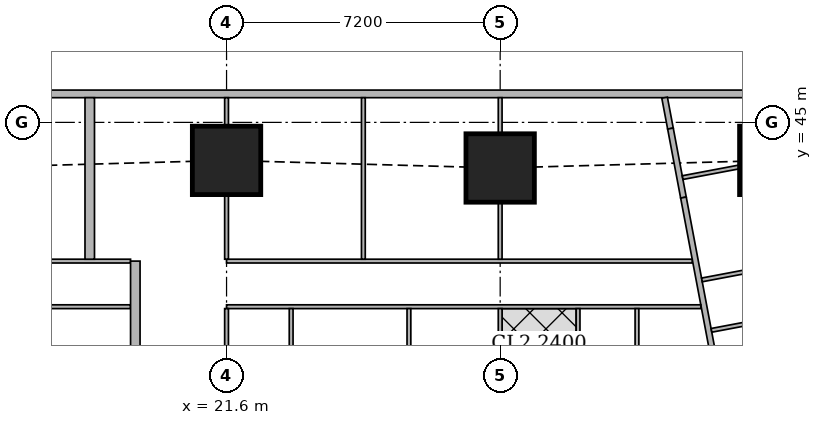
"""IFC4 building model, lengths in metres.
Left out: names, types, materials, properties, quantities, classifications, styles, units other than length and angle.
Written with IfcOpenShell. Run it as: python <this file> out.ifc"""

import sys

from ifc_helpers import new_model, si_unit, direction, frame, frame_2d, origin, origin_2d, place, context, subcontext, project, spatial, rectangle, extrude, element, fill, save


model = new_model("IFC4")
c1 = context("Model", 3, precision=1e-05, world=origin(), true_north=direction((0.0, 1.0)))
c2 = subcontext(c1, "Body", "Model", "MODEL_VIEW")
j1 = project(units=[si_unit("LENGTHUNIT", "METRE"), si_unit("PLANEANGLEUNIT", "RADIAN")], contexts=[c1])
p1 = place(None, origin())
s1 = spatial("IfcSite", under=j1, at=p1, CompositionType="ELEMENT")
p2 = place(p1, origin())
s2 = spatial("IfcBuilding", under=s1, at=p2, CompositionType="ELEMENT")
p3 = place(p2, frame((0.0, 0.0, 158.3)))
s3 = spatial("IfcBuildingStorey", under=s2, at=p3, CompositionType="ELEMENT", Elevation=158.3)
for number, where, z_axis, x_axis in (
    (1, (21.6, 44.0, 0.0), (0.0, 0.0, 1.0), (1.0, 0.0, 0.0)),
    (2, (28.8, 43.8, 0.0), (0.0, 0.0, 1.0), (1.0, 0.0, 0.0)),
    (3, (36.0, 44.0, 0.0), (0.0, 0.0, 1.0), (1.0, 0.0, 0.0)),
):
    element("IfcColumn", number, at=place(p3, frame(where, z_axis=z_axis, x_axis=x_axis)), inside=s3, PredefinedType="COLUMN", context=c2, shape_type="SweptSolid", body=[
        extrude(rectangle(XDim=1.8, YDim=1.8, at=origin_2d()), origin(), (0.0, 0.0, 1.0), 3.75),
    ])
p4 = place(p3, frame((40.106, 45.75, 0.0), z_axis=(0.0, 0.0, 1.0), x_axis=(-1.0, 0.0, 0.0)))
e4 = element("IfcWall", 4, at=p4, inside=s3, PredefinedType="SOLIDWALL", context=c2, shape_type="SweptSolid", body=[
    extrude(rectangle(XDim=37.943, YDim=0.2, at=frame_2d((18.971, 0.0))), origin(), (0.0, 0.0, 1.0), 3.5),
])
p5 = place(p4, frame((8.606, 0.0, 0.9)))
e5 = element("IfcOpeningElement", 5, at=p5, cuts=e4, PredefinedType="OPENING", context=c2, shape_type="SweptSolid", body=[
    extrude(rectangle(XDim=1.8, YDim=1.5, at=frame_2d((0.9, 0.75))), frame((0.0, 0.11, 0.0), z_axis=(0.0, -1.0, 0.0), x_axis=(1.0, 0.0, 0.0)), (0.0, 0.0, 1.0), 0.22),
])
p6 = place(p4, frame((12.206, 0.0, 0.9)))
e6 = element("IfcOpeningElement", 6, at=p6, cuts=e4, PredefinedType="OPENING", context=c2, shape_type="SweptSolid", body=[
    extrude(rectangle(XDim=1.8, YDim=1.5, at=frame_2d((0.9, 0.75))), frame((0.0, 0.11, 0.0), z_axis=(0.0, -1.0, 0.0), x_axis=(1.0, 0.0, 0.0)), (0.0, 0.0, 1.0), 0.22),
])
p7 = place(p4, frame((15.806, 0.0, 0.9)))
e7 = element("IfcOpeningElement", 7, at=p7, cuts=e4, PredefinedType="OPENING", context=c2, shape_type="SweptSolid", body=[
    extrude(rectangle(XDim=1.8, YDim=1.5, at=frame_2d((0.9, 0.75))), frame((0.0, 0.11, 0.0), z_axis=(0.0, -1.0, 0.0), x_axis=(1.0, 0.0, 0.0)), (0.0, 0.0, 1.0), 0.22),
])
p8 = place(p4, frame((19.406, 0.0, 0.9)))
e8 = element("IfcOpeningElement", 8, at=p8, cuts=e4, PredefinedType="OPENING", context=c2, shape_type="SweptSolid", body=[
    extrude(rectangle(XDim=1.8, YDim=1.5, at=frame_2d((0.9, 0.75))), frame((0.0, 0.11, 0.0), z_axis=(0.0, -1.0, 0.0), x_axis=(1.0, 0.0, 0.0)), (0.0, 0.0, 1.0), 0.22),
])
p9 = place(p4, frame((23.006, 0.0, 0.9)))
e9 = element("IfcOpeningElement", 9, at=p9, cuts=e4, PredefinedType="OPENING", context=c2, shape_type="SweptSolid", body=[
    extrude(rectangle(XDim=1.8, YDim=1.5, at=frame_2d((0.9, 0.75))), frame((0.0, 0.11, 0.0), z_axis=(0.0, -1.0, 0.0), x_axis=(1.0, 0.0, 0.0)), (0.0, 0.0, 1.0), 0.22),
])
p10 = place(p4, frame((26.606, 0.0, 0.9)))
e10 = element("IfcOpeningElement", 10, at=p10, cuts=e4, PredefinedType="OPENING", context=c2, shape_type="SweptSolid", body=[
    extrude(rectangle(XDim=1.8, YDim=1.5, at=frame_2d((0.9, 0.75))), frame((0.0, 0.11, 0.0), z_axis=(0.0, -1.0, 0.0), x_axis=(1.0, 0.0, 0.0)), (0.0, 0.0, 1.0), 0.22),
])
p11 = place(p3, frame((33.127, 45.65, 0.0), z_axis=(0.0, 0.0, 1.0), x_axis=(0.186176514576, -0.982516313056, 0.0)))
e11 = element("IfcWall", 11, at=p11, inside=s3, PredefinedType="SOLIDWALL", context=c2, shape_type="SweptSolid", body=[
    extrude(rectangle(XDim=0.827, YDim=0.15, at=frame_2d((0.414, 0.0))), origin(), (0.0, 0.0, 1.0), 3.5),
])
p12 = place(p3, frame((33.281, 44.837, 0.0), z_axis=(0.0, 0.0, 1.0), x_axis=(0.185198323004, -0.982701165745, 0.0)))
e12 = element("IfcWall", 12, at=p12, inside=s3, PredefinedType="SOLIDWALL", context=c2, shape_type="SweptSolid", body=[
    extrude(rectangle(XDim=1.847, YDim=0.15, at=frame_2d((0.923, 0.0))), origin(), (0.0, 0.0, 1.0), 2.1),
])
p13 = place(p3, frame((33.623, 43.022, 0.0), z_axis=(0.0, 0.0, 1.0), x_axis=(0.185596841028, -0.98262597798, 0.0)))
e13 = element("IfcWall", 13, at=p13, inside=s3, PredefinedType="SOLIDWALL", context=c2, shape_type="SweptSolid", body=[
    extrude(rectangle(XDim=41.66, YDim=0.15, at=frame_2d((20.83, 0.0))), origin(), (0.0, 0.0, 1.0), 2.5),
])
p14 = place(p13, frame((21.514, 0.0, 0.0)))
e14 = element("IfcOpeningElement", 14, at=p14, cuts=e13, PredefinedType="OPENING", context=c2, shape_type="SweptSolid", body=[
    extrude(rectangle(XDim=1.0, YDim=2.1, at=frame_2d((0.5, 1.05))), frame((0.0, 0.085, 0.0), z_axis=(0.0, -1.0, 0.0), x_axis=(1.0, 0.0, 0.0)), (0.0, 0.0, 1.0), 0.17),
])
p15 = place(p13, frame((27.062, 0.0, 0.0)))
e15 = element("IfcOpeningElement", 15, at=p15, cuts=e13, PredefinedType="OPENING", context=c2, shape_type="SweptSolid", body=[
    extrude(rectangle(XDim=1.0, YDim=2.1, at=frame_2d((0.5, 1.05))), frame((0.0, 0.085, 0.0), z_axis=(0.0, -1.0, 0.0), x_axis=(1.0, 0.0, 0.0)), (0.0, 0.0, 1.0), 0.17),
])
p16 = place(p13, frame((29.934, 0.0, 0.0)))
e16 = element("IfcOpeningElement", 16, at=p16, cuts=e13, PredefinedType="OPENING", context=c2, shape_type="SweptSolid", body=[
    extrude(rectangle(XDim=1.0, YDim=2.1, at=frame_2d((0.5, 1.05))), frame((0.0, 0.085, 0.0), z_axis=(0.0, -1.0, 0.0), x_axis=(1.0, 0.0, 0.0)), (0.0, 0.0, 1.0), 0.17),
])
p17 = place(p3, frame((35.09, 43.828, 0.0), z_axis=(0.0, 0.0, 1.0), x_axis=(-0.982683801717, -0.185290436461, 0.0)))
e17 = element("IfcWall", 17, at=p17, inside=s3, PredefinedType="PARTITIONING", context=c2, shape_type="SweptSolid", body=[
    extrude(rectangle(XDim=1.515, YDim=0.1, at=frame_2d((0.758, 0.0))), origin(), (0.0, 0.0, 1.0), 2.1),
])
p18 = place(p3, frame((37.824, 40.182, 0.0), z_axis=(0.0, 0.0, 1.0), x_axis=(-0.982648794755, -0.185475998897, 0.0)))
e18 = element("IfcWall", 18, at=p18, inside=s3, PredefinedType="PARTITIONING", context=c2, shape_type="SweptSolid", body=[
    extrude(rectangle(XDim=3.525, YDim=0.1, at=frame_2d((1.763, 0.0))), origin(), (0.0, 0.0, 1.0), 3.5),
])
p19 = place(p3, frame((14.4, 41.35, 0.0), z_axis=(0.0, 0.0, 1.0), x_axis=(1.0, 0.0, 0.0)))
e19 = element("IfcWall", 19, at=p19, inside=s3, PredefinedType="PARTITIONING", context=c2, shape_type="SweptSolid", body=[
    extrude(rectangle(XDim=4.674, YDim=0.1, at=frame_2d((2.337, 0.0))), origin(), (0.0, 0.0, 1.0), 3.5),
])
p20 = place(p19, frame((0.2, 0.0, 0.0)))
e20 = element("IfcOpeningElement", 20, at=p20, cuts=e19, PredefinedType="OPENING", context=c2, shape_type="SweptSolid", body=[
    extrude(rectangle(XDim=0.9, YDim=2.1, at=frame_2d((0.45, 1.05))), frame((0.0, 0.06, 0.0), z_axis=(0.0, -1.0, 0.0), x_axis=(1.0, 0.0, 0.0)), (0.0, 0.0, 1.0), 0.12),
])
p21 = place(p3, frame((14.4, 40.15, 0.0), z_axis=(0.0, 0.0, 1.0), x_axis=(1.0, 0.0, 0.0)))
e21 = element("IfcWall", 21, at=p21, inside=s3, PredefinedType="PARTITIONING", context=c2, shape_type="SweptSolid", body=[
    extrude(rectangle(XDim=4.674, YDim=0.1, at=frame_2d((2.337, 0.0))), origin(), (0.0, 0.0, 1.0), 3.5),
])
p22 = place(p21, frame((0.575, 0.0, 0.0)))
e22 = element("IfcOpeningElement", 22, at=p22, cuts=e21, PredefinedType="OPENING", context=c2, shape_type="SweptSolid", body=[
    extrude(rectangle(XDim=0.9, YDim=2.1, at=frame_2d((0.45, 1.05))), frame((0.0, 0.06, 0.0), z_axis=(0.0, -1.0, 0.0), x_axis=(1.0, 0.0, 0.0)), (0.0, 0.0, 1.0), 0.12),
])
p23 = place(p21, frame((2.975, 0.0, 0.0)))
e23 = element("IfcOpeningElement", 23, at=p23, cuts=e21, PredefinedType="OPENING", context=c2, shape_type="SweptSolid", body=[
    extrude(rectangle(XDim=0.9, YDim=2.1, at=frame_2d((0.45, 1.05))), frame((0.0, 0.06, 0.0), z_axis=(0.0, -1.0, 0.0), x_axis=(1.0, 0.0, 0.0)), (0.0, 0.0, 1.0), 0.12),
])
p24 = place(p3, frame((21.6, 41.35, 0.0), z_axis=(0.0, 0.0, 1.0), x_axis=(1.0, 0.0, 0.0)))
e24 = element("IfcWall", 24, at=p24, inside=s3, PredefinedType="PARTITIONING", context=c2, shape_type="SweptSolid", body=[
    extrude(rectangle(XDim=12.253, YDim=0.1, at=frame_2d((6.126, 0.0))), origin(), (0.0, 0.0, 1.0), 3.5),
])
p25 = place(p24, frame((0.2, 0.0, 0.0)))
e25 = element("IfcOpeningElement", 25, at=p25, cuts=e24, PredefinedType="OPENING", context=c2, shape_type="SweptSolid", body=[
    extrude(rectangle(XDim=0.9, YDim=2.1, at=frame_2d((0.45, 1.05))), frame((0.0, 0.06, 0.0), z_axis=(0.0, -1.0, 0.0), x_axis=(1.0, 0.0, 0.0)), (0.0, 0.0, 1.0), 0.12),
])
p26 = place(p24, frame((3.8, 0.0, 0.0)))
e26 = element("IfcOpeningElement", 26, at=p26, cuts=e24, PredefinedType="OPENING", context=c2, shape_type="SweptSolid", body=[
    extrude(rectangle(XDim=0.9, YDim=2.1, at=frame_2d((0.45, 1.05))), frame((0.0, 0.06, 0.0), z_axis=(0.0, -1.0, 0.0), x_axis=(1.0, 0.0, 0.0)), (0.0, 0.0, 1.0), 0.12),
])
p27 = place(p24, frame((7.4, 0.0, 0.0)))
e27 = element("IfcOpeningElement", 27, at=p27, cuts=e24, PredefinedType="OPENING", context=c2, shape_type="SweptSolid", body=[
    extrude(rectangle(XDim=0.9, YDim=2.1, at=frame_2d((0.45, 1.05))), frame((0.0, 0.06, 0.0), z_axis=(0.0, -1.0, 0.0), x_axis=(1.0, 0.0, 0.0)), (0.0, 0.0, 1.0), 0.12),
])
p28 = place(p3, frame((21.6, 40.15, 0.0), z_axis=(0.0, 0.0, 1.0), x_axis=(1.0, 0.0, 0.0)))
e28 = element("IfcWall", 28, at=p28, inside=s3, PredefinedType="PARTITIONING", context=c2, shape_type="SweptSolid", body=[
    extrude(rectangle(XDim=12.48, YDim=0.1, at=frame_2d((6.24, 0.0))), origin(), (0.0, 0.0, 1.0), 3.5),
])
p29 = place(p28, frame((0.4, 0.0, 0.0)))
e29 = element("IfcOpeningElement", 29, at=p29, cuts=e28, PredefinedType="OPENING", context=c2, shape_type="SweptSolid", body=[
    extrude(rectangle(XDim=0.9, YDim=2.1, at=frame_2d((0.45, 1.05))), frame((0.0, 0.06, 0.0), z_axis=(0.0, -1.0, 0.0), x_axis=(1.0, 0.0, 0.0)), (0.0, 0.0, 1.0), 0.12),
])
p30 = place(p28, frame((5.549, 0.0, 0.0)))
e30 = element("IfcOpeningElement", 30, at=p30, cuts=e28, PredefinedType="OPENING", context=c2, shape_type="SweptSolid", body=[
    extrude(rectangle(XDim=0.9, YDim=2.1, at=frame_2d((0.45, 1.05))), frame((0.0, 0.06, 0.0), z_axis=(0.0, -1.0, 0.0), x_axis=(1.0, 0.0, 0.0)), (0.0, 0.0, 1.0), 0.12),
])
p31 = place(p28, frame((7.775, 0.0, 0.0)))
e31 = element("IfcOpeningElement", 31, at=p31, cuts=e28, PredefinedType="OPENING", context=c2, shape_type="SweptSolid", body=[
    extrude(rectangle(XDim=0.9, YDim=2.1, at=frame_2d((0.45, 1.05))), frame((0.0, 0.06, 0.0), z_axis=(0.0, -1.0, 0.0), x_axis=(1.0, 0.0, 0.0)), (0.0, 0.0, 1.0), 0.12),
])
p32 = place(p28, frame((11.43, 0.0, 0.0)))
e32 = element("IfcOpeningElement", 32, at=p32, cuts=e28, PredefinedType="OPENING", context=c2, shape_type="SweptSolid", body=[
    extrude(rectangle(XDim=0.9, YDim=2.1, at=frame_2d((0.45, 1.05))), frame((0.0, 0.06, 0.0), z_axis=(0.0, -1.0, 0.0), x_axis=(1.0, 0.0, 0.0)), (0.0, 0.0, 1.0), 0.12),
])
p33 = place(p28, frame((2.799, 0.0, 0.0)))
e33 = element("IfcOpeningElement", 33, at=p33, cuts=e28, PredefinedType="OPENING", context=c2, shape_type="SweptSolid", body=[
    extrude(rectangle(XDim=0.9, YDim=2.1, at=frame_2d((0.45, 1.05))), frame((0.0, 0.06, 0.0), z_axis=(0.0, -1.0, 0.0), x_axis=(1.0, 0.0, 0.0)), (0.0, 0.0, 1.0), 0.12),
])
p34 = place(p28, frame((9.575, 0.0, 0.0)))
e34 = element("IfcOpeningElement", 34, at=p34, cuts=e28, PredefinedType="OPENING", context=c2, shape_type="SweptSolid", body=[
    extrude(rectangle(XDim=0.9, YDim=2.1, at=frame_2d((0.45, 1.05))), frame((0.0, 0.06, 0.0), z_axis=(0.0, -1.0, 0.0), x_axis=(1.0, 0.0, 0.0)), (0.0, 0.0, 1.0), 0.12),
])
p35 = place(p3, frame((21.6, 41.4, 0.0), z_axis=(0.0, 0.0, 1.0), x_axis=(0.0, 1.0, 0.0)))
e35 = element("IfcWall", 35, at=p35, inside=s3, PredefinedType="PARTITIONING", context=c2, shape_type="SweptSolid", body=[
    extrude(rectangle(XDim=1.699, YDim=0.1, at=frame_2d((0.85, 0.0))), origin(), (0.0, 0.0, 1.0), 3.5),
])
p36 = place(p3, frame((21.6, 44.901, 0.0), z_axis=(0.0, 0.0, 1.0), x_axis=(0.0, 1.0, 0.0)))
e36 = element("IfcWall", 36, at=p36, inside=s3, PredefinedType="PARTITIONING", context=c2, shape_type="SweptSolid", body=[
    extrude(rectangle(XDim=0.749, YDim=0.1, at=frame_2d((0.375, 0.0))), origin(), (0.0, 0.0, 1.0), 3.5),
])
p37 = place(p3, frame((25.2, 41.4, 0.0), z_axis=(0.0, 0.0, 1.0), x_axis=(0.0, 1.0, 0.0)))
e37 = element("IfcWall", 37, at=p37, inside=s3, PredefinedType="PARTITIONING", context=c2, shape_type="SweptSolid", body=[
    extrude(rectangle(XDim=4.25, YDim=0.1, at=frame_2d((2.125, 0.0))), origin(), (0.0, 0.0, 1.0), 2.1),
])
p38 = place(p3, frame((28.8, 41.4, 0.0), z_axis=(0.0, 0.0, 1.0), x_axis=(0.0, 1.0, 0.0)))
e38 = element("IfcWall", 38, at=p38, inside=s3, PredefinedType="PARTITIONING", context=c2, shape_type="SweptSolid", body=[
    extrude(rectangle(XDim=1.499, YDim=0.1, at=frame_2d((0.75, 0.0))), origin(), (0.0, 0.0, 1.0), 3.5),
])
p39 = place(p3, frame((28.8, 44.701, 0.0), z_axis=(0.0, 0.0, 1.0), x_axis=(0.0, 1.0, 0.0)))
e39 = element("IfcWall", 39, at=p39, inside=s3, PredefinedType="PARTITIONING", context=c2, shape_type="SweptSolid", body=[
    extrude(rectangle(XDim=0.949, YDim=0.1, at=frame_2d((0.475, 0.0))), origin(), (0.0, 0.0, 1.0), 3.5),
])
p40 = place(p3, frame((21.6, 38.251, 0.0), z_axis=(0.0, 0.0, 1.0), x_axis=(0.0, 1.0, 0.0)))
e40 = element("IfcWall", 40, at=p40, inside=s3, PredefinedType="PARTITIONING", context=c2, shape_type="SweptSolid", body=[
    extrude(rectangle(XDim=1.849, YDim=0.1, at=frame_2d((0.925, 0.0))), origin(), (0.0, 0.0, 1.0), 3.5),
])
p41 = place(p3, frame((26.399, 36.575, 0.0), z_axis=(0.0, 0.0, 1.0), x_axis=(0.0, 1.0, 0.0)))
e41 = element("IfcWall", 41, at=p41, inside=s3, PredefinedType="PARTITIONING", context=c2, shape_type="SweptSolid", body=[
    extrude(rectangle(XDim=3.525, YDim=0.1, at=frame_2d((1.763, 0.0))), origin(), (0.0, 0.0, 1.0), 3.5),
])
p42 = place(p3, frame((28.8, 38.251, 0.0), z_axis=(0.0, 0.0, 1.0), x_axis=(0.0, 1.0, 0.0)))
e42 = element("IfcWall", 42, at=p42, inside=s3, PredefinedType="PARTITIONING", context=c2, shape_type="SweptSolid", body=[
    extrude(rectangle(XDim=1.849, YDim=0.1, at=frame_2d((0.925, 0.0))), origin(), (0.0, 0.0, 1.0), 3.5),
])
for number, where, z_axis, x_axis in (
    (43, (32.4, 36.575, 0.0), (0.0, 0.0, 1.0), (0.0, 1.0, 0.0)),
    (44, (23.3, 36.575, 0.0), (0.0, 0.0, 1.0), (0.0, 1.0, 0.0)),
    (45, (30.85, 36.575, 0.0), (0.0, 0.0, 1.0), (0.0, 1.0, 0.0)),
):
    element("IfcWall", number, at=place(p3, frame(where, z_axis=z_axis, x_axis=x_axis)), inside=s3, PredefinedType="PARTITIONING", context=c2, shape_type="SweptSolid", body=[
        extrude(rectangle(XDim=3.525, YDim=0.1, at=frame_2d((1.763, 0.0))), origin(), (0.0, 0.0, 1.0), 3.5),
    ])
p43 = place(p3, frame((18.0, 41.4, 0.0), z_axis=(0.0, 0.0, 1.0), x_axis=(0.0, 1.0, 0.0)))
e46 = element("IfcWall", 46, at=p43, inside=s3, PredefinedType="SOLIDWALL", context=c2, shape_type="SweptSolid", body=[
    extrude(rectangle(XDim=4.25, YDim=0.25, at=frame_2d((2.125, 0.0))), origin(), (0.0, 0.0, 1.0), 2.1),
])
p44 = place(p3, frame((19.199, 36.575, 0.0), z_axis=(0.0, 0.0, 1.0), x_axis=(0.0, 1.0, 0.0)))
e47 = element("IfcWall", 47, at=p44, inside=s3, PredefinedType="SOLIDWALL", context=c2, shape_type="SweptSolid", body=[
    extrude(rectangle(XDim=4.775, YDim=0.25, at=frame_2d((2.388, 0.0))), origin(), (0.0, 0.0, 1.0), 3.5),
])
p45 = place(p3, frame((37.573, 41.509, 0.0), z_axis=(0.0, 0.0, 1.0), x_axis=(-0.982638553676, -0.185530247748, 0.0)))
e48 = element("IfcWall", 48, at=p45, inside=s3, PredefinedType="PARTITIONING", context=c2, shape_type="SweptSolid", body=[
    extrude(rectangle(XDim=3.525, YDim=0.1, at=frame_2d((1.763, 0.0))), origin(), (0.0, 0.0, 1.0), 3.5),
])
p46 = place(p45, frame((1.325, 0.0, 0.0)))
e49 = element("IfcOpeningElement", 49, at=p46, cuts=e48, PredefinedType="OPENING", context=c2, shape_type="SweptSolid", body=[
    extrude(rectangle(XDim=0.9, YDim=2.1, at=frame_2d((0.45, 1.05))), frame((0.0, 0.06, 0.0), z_axis=(0.0, -1.0, 0.0), x_axis=(1.0, 0.0, 0.0)), (0.0, 0.0, 1.0), 0.12),
])
p47 = place(p5, origin())
e50 = element("IfcWindow", 50, at=p47, inside=s3, PartitioningType="SINGLE_PANEL", PredefinedType="WINDOW", context=c2, shape_type="SweptSolid", body=[
    extrude(rectangle(XDim=1.8, YDim=1.5, at=frame_2d((0.9, 0.75))), frame((0.0, 0.03, 0.0), z_axis=(0.0, -1.0, 0.0), x_axis=(1.0, 0.0, 0.0)), (0.0, 0.0, 1.0), 0.06),
])
fill(e5, e50)
p48 = place(p6, origin())
e51 = element("IfcWindow", 51, at=p48, inside=s3, PartitioningType="SINGLE_PANEL", PredefinedType="WINDOW", context=c2, shape_type="SweptSolid", body=[
    extrude(rectangle(XDim=1.8, YDim=1.5, at=frame_2d((0.9, 0.75))), frame((0.0, 0.03, 0.0), z_axis=(0.0, -1.0, 0.0), x_axis=(1.0, 0.0, 0.0)), (0.0, 0.0, 1.0), 0.06),
])
fill(e6, e51)
p49 = place(p7, origin())
e52 = element("IfcWindow", 52, at=p49, inside=s3, PartitioningType="SINGLE_PANEL", PredefinedType="WINDOW", context=c2, shape_type="SweptSolid", body=[
    extrude(rectangle(XDim=1.8, YDim=1.5, at=frame_2d((0.9, 0.75))), frame((0.0, 0.03, 0.0), z_axis=(0.0, -1.0, 0.0), x_axis=(1.0, 0.0, 0.0)), (0.0, 0.0, 1.0), 0.06),
])
fill(e7, e52)
p50 = place(p8, origin())
e53 = element("IfcWindow", 53, at=p50, inside=s3, PartitioningType="SINGLE_PANEL", PredefinedType="WINDOW", context=c2, shape_type="SweptSolid", body=[
    extrude(rectangle(XDim=1.8, YDim=1.5, at=frame_2d((0.9, 0.75))), frame((0.0, 0.03, 0.0), z_axis=(0.0, -1.0, 0.0), x_axis=(1.0, 0.0, 0.0)), (0.0, 0.0, 1.0), 0.06),
])
fill(e8, e53)
p51 = place(p9, origin())
e54 = element("IfcWindow", 54, at=p51, inside=s3, PartitioningType="SINGLE_PANEL", PredefinedType="WINDOW", context=c2, shape_type="SweptSolid", body=[
    extrude(rectangle(XDim=1.8, YDim=1.5, at=frame_2d((0.9, 0.75))), frame((0.0, 0.03, 0.0), z_axis=(0.0, -1.0, 0.0), x_axis=(1.0, 0.0, 0.0)), (0.0, 0.0, 1.0), 0.06),
])
fill(e9, e54)
p52 = place(p23, origin())
e55 = element("IfcDoor", 55, at=p52, inside=s3, OperationType="SINGLE_SWING_LEFT", PredefinedType="DOOR", context=c2, shape_type="SweptSolid", body=[
    extrude(rectangle(XDim=0.9, YDim=2.1, at=frame_2d((0.45, 1.05))), frame((0.0, 0.025, 0.0), z_axis=(0.0, -1.0, 0.0), x_axis=(1.0, 0.0, 0.0)), (0.0, 0.0, 1.0), 0.05),
])
fill(e23, e55)
p53 = place(p25, origin())
e56 = element("IfcDoor", 56, at=p53, inside=s3, OperationType="SINGLE_SWING_LEFT", PredefinedType="DOOR", context=c2, shape_type="SweptSolid", body=[
    extrude(rectangle(XDim=0.9, YDim=2.1, at=frame_2d((0.45, 1.05))), frame((0.0, 0.025, 0.0), z_axis=(0.0, -1.0, 0.0), x_axis=(1.0, 0.0, 0.0)), (0.0, 0.0, 1.0), 0.05),
])
fill(e25, e56)
p54 = place(p26, origin())
e57 = element("IfcDoor", 57, at=p54, inside=s3, OperationType="SINGLE_SWING_LEFT", PredefinedType="DOOR", context=c2, shape_type="SweptSolid", body=[
    extrude(rectangle(XDim=0.9, YDim=2.1, at=frame_2d((0.45, 1.05))), frame((0.0, 0.025, 0.0), z_axis=(0.0, -1.0, 0.0), x_axis=(1.0, 0.0, 0.0)), (0.0, 0.0, 1.0), 0.05),
])
fill(e26, e57)
p55 = place(p27, origin())
e58 = element("IfcDoor", 58, at=p55, inside=s3, OperationType="SINGLE_SWING_LEFT", PredefinedType="DOOR", context=c2, shape_type="SweptSolid", body=[
    extrude(rectangle(XDim=0.9, YDim=2.1, at=frame_2d((0.45, 1.05))), frame((0.0, 0.025, 0.0), z_axis=(0.0, -1.0, 0.0), x_axis=(1.0, 0.0, 0.0)), (0.0, 0.0, 1.0), 0.05),
])
fill(e27, e58)
p56 = place(p29, origin())
e59 = element("IfcDoor", 59, at=p56, inside=s3, OperationType="SINGLE_SWING_RIGHT", PredefinedType="DOOR", context=c2, shape_type="SweptSolid", body=[
    extrude(rectangle(XDim=0.9, YDim=2.1, at=frame_2d((0.45, 1.05))), frame((0.0, 0.025, 0.0), z_axis=(0.0, -1.0, 0.0), x_axis=(1.0, 0.0, 0.0)), (0.0, 0.0, 1.0), 0.05),
])
fill(e29, e59)
p57 = place(p30, origin())
e60 = element("IfcDoor", 60, at=p57, inside=s3, OperationType="SINGLE_SWING_LEFT", PredefinedType="DOOR", context=c2, shape_type="SweptSolid", body=[
    extrude(rectangle(XDim=0.9, YDim=2.1, at=frame_2d((0.45, 1.05))), frame((0.0, 0.025, 0.0), z_axis=(0.0, -1.0, 0.0), x_axis=(1.0, 0.0, 0.0)), (0.0, 0.0, 1.0), 0.05),
])
fill(e30, e60)
p58 = place(p31, origin())
e61 = element("IfcDoor", 61, at=p58, inside=s3, OperationType="SINGLE_SWING_LEFT", PredefinedType="DOOR", context=c2, shape_type="SweptSolid", body=[
    extrude(rectangle(XDim=0.9, YDim=2.1, at=frame_2d((0.45, 1.05))), frame((0.0, 0.025, 0.0), z_axis=(0.0, -1.0, 0.0), x_axis=(1.0, 0.0, 0.0)), (0.0, 0.0, 1.0), 0.05),
])
fill(e31, e61)
p59 = place(p32, origin())
e62 = element("IfcDoor", 62, at=p59, inside=s3, OperationType="SINGLE_SWING_LEFT", PredefinedType="DOOR", context=c2, shape_type="SweptSolid", body=[
    extrude(rectangle(XDim=0.9, YDim=2.1, at=frame_2d((0.45, 1.05))), frame((0.0, 0.025, 0.0), z_axis=(0.0, -1.0, 0.0), x_axis=(1.0, 0.0, 0.0)), (0.0, 0.0, 1.0), 0.05),
])
fill(e32, e62)
p60 = place(p33, origin())
e63 = element("IfcDoor", 63, at=p60, inside=s3, OperationType="SINGLE_SWING_RIGHT", PredefinedType="DOOR", context=c2, shape_type="SweptSolid", body=[
    extrude(rectangle(XDim=0.9, YDim=2.1, at=frame_2d((0.45, 1.05))), frame((0.0, 0.025, 0.0), z_axis=(0.0, -1.0, 0.0), x_axis=(1.0, 0.0, 0.0)), (0.0, 0.0, 1.0), 0.05),
])
fill(e33, e63)
p61 = place(p34, origin())
e64 = element("IfcDoor", 64, at=p61, inside=s3, OperationType="SINGLE_SWING_RIGHT", PredefinedType="DOOR", context=c2, shape_type="SweptSolid", body=[
    extrude(rectangle(XDim=0.9, YDim=2.1, at=frame_2d((0.45, 1.05))), frame((0.0, 0.025, 0.0), z_axis=(0.0, -1.0, 0.0), x_axis=(1.0, 0.0, 0.0)), (0.0, 0.0, 1.0), 0.05),
])
fill(e34, e64)
save(model, sys.argv[1])
